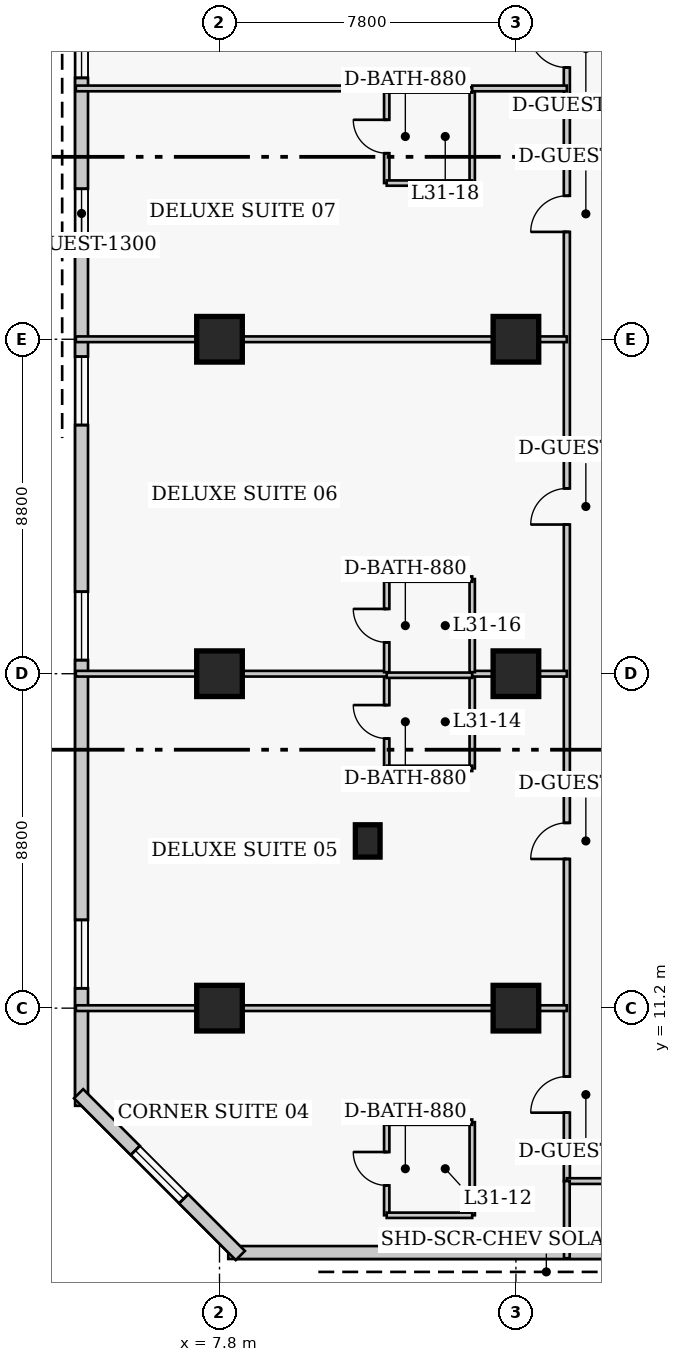
"""IFC4 building model, lengths in metres.
Left out: names, types, materials, properties, quantities, classifications, styles, units other than length and angle.
Written with IfcOpenShell. Run it as: python <this file> out.ifc"""

import sys

from ifc_helpers import new_model, si_unit, direction, frame, frame_2d, origin, origin_2d, place, context, subcontext, project, spatial, rectangle, extrude, element, fill, save


model = new_model("IFC4")
c1 = context("Model", 3, precision=1e-05, world=origin(), true_north=direction((0.0, 1.0)))
c2 = subcontext(c1, "Body", "Model", "MODEL_VIEW")
j1 = project(units=[si_unit("LENGTHUNIT", "METRE"), si_unit("PLANEANGLEUNIT", "RADIAN")], contexts=[c1])
p1 = place(None, origin())
s1 = spatial("IfcSite", under=j1, at=p1, CompositionType="ELEMENT")
p2 = place(p1, origin())
s2 = spatial("IfcBuilding", under=s1, at=p2, CompositionType="ELEMENT")
p3 = place(p2, frame((0.0, 0.0, 126.0)))
s3 = spatial("IfcBuildingStorey", under=s2, at=p3, CompositionType="ELEMENT", Elevation=126.0)
for number, where, z_axis, x_axis in (
    (1, (7.8, 11.2, 0.0), (0.0, 0.0, 1.0), (1.0, 0.0, 0.0)),
    (2, (7.8, 20.0, 0.0), (0.0, 0.0, 1.0), (1.0, 0.0, 0.0)),
    (3, (7.8, 28.8, 0.0), (0.0, 0.0, 1.0), (1.0, 0.0, 0.0)),
    (4, (15.6, 11.2, 0.0), (0.0, 0.0, 1.0), (1.0, 0.0, 0.0)),
    (5, (15.6, 20.0, 0.0), (0.0, 0.0, 1.0), (1.0, 0.0, 0.0)),
    (6, (15.6, 28.8, 0.0), (0.0, 0.0, 1.0), (1.0, 0.0, 0.0)),
):
    element("IfcColumn", number, at=place(p3, frame(where, z_axis=z_axis, x_axis=x_axis)), inside=s3, PredefinedType="COLUMN", context=c2, shape_type="SweptSolid", body=[
        extrude(rectangle(XDim=1.2, YDim=1.2, at=origin_2d()), origin(), (0.0, 0.0, 1.0), 3.8),
    ])
p4 = place(p3, frame((11.7, 15.6, 0.0), z_axis=(0.0, 0.0, 1.0), x_axis=(1.0, 0.0, 0.0)))
e7 = element("IfcColumn", 7, at=p4, inside=s3, PredefinedType="PILASTER", context=c2, shape_type="SweptSolid", body=[
    extrude(rectangle(XDim=0.65, YDim=0.85, at=origin_2d()), origin(), (0.0, 0.0, 1.0), 3.8),
])
p5 = place(p3, frame((8.03, 4.77, 0.0), z_axis=(0.0, 0.0, 1.0), x_axis=(1.0, 0.0, 0.0)))
e8 = element("IfcWall", 8, at=p5, inside=s3, PredefinedType="SOLIDWALL", context=c2, shape_type="SweptSolid", body=[
    extrude(rectangle(XDim=28.29, YDim=0.34, at=frame_2d((14.145, 0.0))), origin(), (0.0, 0.0, 1.0), 3.46),
])
p6 = place(p5, frame((12.595, 0.0, 0.85)))
e9 = element("IfcOpeningElement", 9, at=p6, cuts=e8, PredefinedType="OPENING", context=c2, shape_type="SweptSolid", body=[
    extrude(rectangle(XDim=1.8, YDim=1.8, at=frame_2d((0.9, 0.9))), frame((0.0, 0.18, 0.0), z_axis=(0.0, -1.0, 0.0), x_axis=(1.0, 0.0, 0.0)), (0.0, 0.0, 1.0), 0.36),
])
p7 = place(p3, frame((4.17, 40.57, 0.0), z_axis=(0.0, 0.0, 1.0), x_axis=(0.0, -1.0, 0.0)))
e10 = element("IfcWall", 10, at=p7, inside=s3, PredefinedType="SOLIDWALL", context=c2, shape_type="SweptSolid", body=[
    extrude(rectangle(XDim=31.94, YDim=0.34, at=frame_2d((15.97, 0.0))), origin(), (0.0, 0.0, 1.0), 3.46),
])
p8 = place(p7, frame((3.093, 0.0, 0.85)))
e11 = element("IfcOpeningElement", 11, at=p8, cuts=e10, PredefinedType="OPENING", context=c2, shape_type="SweptSolid", body=[
    extrude(rectangle(XDim=1.8, YDim=1.8, at=frame_2d((0.9, 0.9))), frame((0.0, 0.18, 0.0), z_axis=(0.0, -1.0, 0.0), x_axis=(1.0, 0.0, 0.0)), (0.0, 0.0, 1.0), 0.36),
])
p9 = place(p7, frame((12.228, 0.0, 0.85)))
e12 = element("IfcOpeningElement", 12, at=p9, cuts=e10, PredefinedType="OPENING", context=c2, shape_type="SweptSolid", body=[
    extrude(rectangle(XDim=1.8, YDim=1.8, at=frame_2d((0.9, 0.9))), frame((0.0, 0.18, 0.0), z_axis=(0.0, -1.0, 0.0), x_axis=(1.0, 0.0, 0.0)), (0.0, 0.0, 1.0), 0.36),
])
p10 = place(p7, frame((18.413, 0.0, 0.85)))
e13 = element("IfcOpeningElement", 13, at=p10, cuts=e10, PredefinedType="OPENING", context=c2, shape_type="SweptSolid", body=[
    extrude(rectangle(XDim=1.8, YDim=1.8, at=frame_2d((0.9, 0.9))), frame((0.0, 0.18, 0.0), z_axis=(0.0, -1.0, 0.0), x_axis=(1.0, 0.0, 0.0)), (0.0, 0.0, 1.0), 0.36),
])
p11 = place(p7, frame((27.048, 0.0, 0.85)))
e14 = element("IfcOpeningElement", 14, at=p11, cuts=e10, PredefinedType="OPENING", context=c2, shape_type="SweptSolid", body=[
    extrude(rectangle(XDim=1.8, YDim=1.8, at=frame_2d((0.9, 0.9))), frame((0.0, 0.18, 0.0), z_axis=(0.0, -1.0, 0.0), x_axis=(1.0, 0.0, 0.0)), (0.0, 0.0, 1.0), 0.36),
])
p12 = place(p7, frame((7.81, 0.0, 0.85)))
e15 = element("IfcOpeningElement", 15, at=p12, cuts=e10, PredefinedType="OPENING", context=c2, shape_type="SweptSolid", body=[
    extrude(rectangle(XDim=1.3, YDim=1.7, at=frame_2d((0.65, 0.85))), frame((0.0, 0.18, 0.0), z_axis=(0.0, -1.0, 0.0), x_axis=(1.0, 0.0, 0.0)), (0.0, 0.0, 1.0), 0.36),
])
p13 = place(p3, frame((4.092, 8.948, 0.0), z_axis=(0.0, 0.0, 1.0), x_axis=(0.707106781187, -0.707106781187, 0.0)))
e16 = element("IfcWall", 16, at=p13, inside=s3, PredefinedType="SOLIDWALL", context=c2, shape_type="SweptSolid", body=[
    extrude(rectangle(XDim=6.02, YDim=0.34, at=frame_2d((3.01, 0.0))), origin(), (0.0, 0.0, 1.0), 3.46),
])
p14 = place(p13, frame((2.11, 0.0, 0.85)))
e17 = element("IfcOpeningElement", 17, at=p14, cuts=e16, PredefinedType="OPENING", context=c2, shape_type="SweptSolid", body=[
    extrude(rectangle(XDim=1.8, YDim=1.8, at=frame_2d((0.9, 0.9))), frame((0.0, 0.18, 0.0), z_axis=(0.0, -1.0, 0.0), x_axis=(1.0, 0.0, 0.0)), (0.0, 0.0, 1.0), 0.36),
])
p15 = place(p3, frame((16.94, 6.65, 0.0), z_axis=(0.0, 0.0, 1.0), x_axis=(0.0, 1.0, 0.0)))
e18 = element("IfcWall", 18, at=p15, inside=s3, PredefinedType="PARTITIONING", context=c2, shape_type="SweptSolid", body=[
    extrude(rectangle(XDim=34.0, YDim=0.16, at=frame_2d((17.0, 0.0))), origin(), (0.0, 0.0, 1.0), 3.46),
])
p16 = place(p15, frame((1.8, 0.0, 0.0)))
e19 = element("IfcOpeningElement", 19, at=p16, cuts=e18, PredefinedType="OPENING", context=c2, shape_type="SweptSolid", body=[
    extrude(rectangle(XDim=0.95, YDim=2.1, at=frame_2d((0.475, 1.05))), frame((0.0, 0.09, 0.0), z_axis=(0.0, -1.0, 0.0), x_axis=(1.0, 0.0, 0.0)), (0.0, 0.0, 1.0), 0.18),
])
p17 = place(p15, frame((8.475, 0.0, 0.0)))
e20 = element("IfcOpeningElement", 20, at=p17, cuts=e18, PredefinedType="OPENING", context=c2, shape_type="SweptSolid", body=[
    extrude(rectangle(XDim=0.95, YDim=2.1, at=frame_2d((0.475, 1.05))), frame((0.0, 0.09, 0.0), z_axis=(0.0, -1.0, 0.0), x_axis=(1.0, 0.0, 0.0)), (0.0, 0.0, 1.0), 0.18),
])
p18 = place(p15, frame((17.275, 0.0, 0.0)))
e21 = element("IfcOpeningElement", 21, at=p18, cuts=e18, PredefinedType="OPENING", context=c2, shape_type="SweptSolid", body=[
    extrude(rectangle(XDim=0.95, YDim=2.1, at=frame_2d((0.475, 1.05))), frame((0.0, 0.09, 0.0), z_axis=(0.0, -1.0, 0.0), x_axis=(1.0, 0.0, 0.0)), (0.0, 0.0, 1.0), 0.18),
])
p19 = place(p15, frame((24.975, 0.0, 0.0)))
e22 = element("IfcOpeningElement", 22, at=p19, cuts=e18, PredefinedType="OPENING", context=c2, shape_type="SweptSolid", body=[
    extrude(rectangle(XDim=0.95, YDim=2.1, at=frame_2d((0.475, 1.05))), frame((0.0, 0.09, 0.0), z_axis=(0.0, -1.0, 0.0), x_axis=(1.0, 0.0, 0.0)), (0.0, 0.0, 1.0), 0.18),
])
p20 = place(p15, frame((29.3, 0.0, 0.0)))
e23 = element("IfcOpeningElement", 23, at=p20, cuts=e18, PredefinedType="OPENING", context=c2, shape_type="SweptSolid", body=[
    extrude(rectangle(XDim=1.0, YDim=2.15, at=frame_2d((0.5, 1.075))), frame((0.0, 0.09, 0.0), z_axis=(0.0, -1.0, 0.0), x_axis=(1.0, 0.0, 0.0)), (0.0, 0.0, 1.0), 0.18),
])
p21 = place(p3, frame((16.94, 6.65, 0.0), z_axis=(0.0, 0.0, 1.0), x_axis=(1.0, 0.0, 0.0)))
e24 = element("IfcWall", 24, at=p21, inside=s3, PredefinedType="PARTITIONING", context=c2, shape_type="SweptSolid", body=[
    extrude(rectangle(XDim=2.22, YDim=0.15, at=frame_2d((1.11, 0.0))), origin(), (0.0, 0.0, 1.0), 3.46),
])
p22 = place(p3, frame((16.94, 4.62, 0.0), z_axis=(0.0, 0.0, 1.0), x_axis=(0.0, 1.0, 0.0)))
e25 = element("IfcWall", 25, at=p22, inside=s3, PredefinedType="PARTITIONING", context=c2, shape_type="SweptSolid", body=[
    extrude(rectangle(XDim=2.03, YDim=0.15, at=frame_2d((1.015, 0.0))), origin(), (0.0, 0.0, 1.0), 3.46),
])
p23 = place(p3, frame((12.2, 5.75, 0.0), z_axis=(0.0, 0.0, 1.0), x_axis=(0.0, 1.0, 0.0)))
e26 = element("IfcWall", 26, at=p23, inside=s3, PredefinedType="PLUMBINGWALL", context=c2, shape_type="SweptSolid", body=[
    extrude(rectangle(XDim=2.45, YDim=0.14, at=frame_2d((1.225, 0.0))), origin(), (0.0, 0.0, 1.0), 3.46),
])
p24 = place(p23, frame((0.785, 0.0, 0.0)))
e27 = element("IfcOpeningElement", 27, at=p24, cuts=e26, PredefinedType="OPENING", context=c2, shape_type="SweptSolid", body=[
    extrude(rectangle(XDim=0.88, YDim=2.05, at=frame_2d((0.44, 1.025))), frame((0.0, 0.08, 0.0), z_axis=(0.0, -1.0, 0.0), x_axis=(1.0, 0.0, 0.0)), (0.0, 0.0, 1.0), 0.16),
])
p25 = place(p3, frame((14.45, 5.75, 0.0), z_axis=(0.0, 0.0, 1.0), x_axis=(0.0, 1.0, 0.0)))
e28 = element("IfcWall", 28, at=p25, inside=s3, PredefinedType="PLUMBINGWALL", context=c2, shape_type="SweptSolid", body=[
    extrude(rectangle(XDim=2.45, YDim=0.14, at=frame_2d((1.225, 0.0))), origin(), (0.0, 0.0, 1.0), 3.46),
])
for number, where, z_axis, x_axis in (
    (29, (12.2, 5.75, 0.0), (0.0, 0.0, 1.0), (1.0, 0.0, 0.0)),
    (30, (12.2, 8.2, 0.0), (0.0, 0.0, 1.0), (1.0, 0.0, 0.0)),
):
    element("IfcWall", number, at=place(p3, frame(where, z_axis=z_axis, x_axis=x_axis)), inside=s3, PredefinedType="PLUMBINGWALL", context=c2, shape_type="SweptSolid", body=[
        extrude(rectangle(XDim=2.25, YDim=0.14, at=frame_2d((1.125, 0.0))), origin(), (0.0, 0.0, 1.0), 3.46),
    ])
p26 = place(p3, frame((4.02, 11.2, 0.0), z_axis=(0.0, 0.0, 1.0), x_axis=(1.0, 0.0, 0.0)))
e31 = element("IfcWall", 31, at=p26, inside=s3, PredefinedType="PARTITIONING", context=c2, shape_type="SweptSolid", body=[
    extrude(rectangle(XDim=12.92, YDim=0.15, at=frame_2d((6.46, 0.0))), origin(), (0.0, 0.0, 1.0), 2.599),
])
p27 = place(p3, frame((12.2, 17.51, 0.0), z_axis=(0.0, 0.0, 1.0), x_axis=(0.0, 1.0, 0.0)))
e32 = element("IfcWall", 32, at=p27, inside=s3, PredefinedType="PLUMBINGWALL", context=c2, shape_type="SweptSolid", body=[
    extrude(rectangle(XDim=2.45, YDim=0.14, at=frame_2d((1.225, 0.0))), origin(), (0.0, 0.0, 1.0), 3.46),
])
p28 = place(p27, frame((0.785, 0.0, 0.0)))
e33 = element("IfcOpeningElement", 33, at=p28, cuts=e32, PredefinedType="OPENING", context=c2, shape_type="SweptSolid", body=[
    extrude(rectangle(XDim=0.88, YDim=2.05, at=frame_2d((0.44, 1.025))), frame((0.0, 0.08, 0.0), z_axis=(0.0, -1.0, 0.0), x_axis=(1.0, 0.0, 0.0)), (0.0, 0.0, 1.0), 0.16),
])
p29 = place(p3, frame((14.45, 17.51, 0.0), z_axis=(0.0, 0.0, 1.0), x_axis=(0.0, 1.0, 0.0)))
e34 = element("IfcWall", 34, at=p29, inside=s3, PredefinedType="PLUMBINGWALL", context=c2, shape_type="SweptSolid", body=[
    extrude(rectangle(XDim=2.45, YDim=0.14, at=frame_2d((1.225, 0.0))), origin(), (0.0, 0.0, 1.0), 3.46),
])
p30 = place(p3, frame((12.2, 17.51, 0.0), z_axis=(0.0, 0.0, 1.0), x_axis=(1.0, 0.0, 0.0)))
e35 = element("IfcWall", 35, at=p30, inside=s3, PredefinedType="PLUMBINGWALL", context=c2, shape_type="SweptSolid", body=[
    extrude(rectangle(XDim=2.25, YDim=0.14, at=frame_2d((1.125, 0.0))), origin(), (0.0, 0.0, 1.0), 3.46),
])
p31 = place(p3, frame((12.2, 19.96, 0.0), z_axis=(0.0, 0.0, 1.0), x_axis=(1.0, 0.0, 0.0)))
e36 = element("IfcWall", 36, at=p31, inside=s3, PredefinedType="PLUMBINGWALL", context=c2, shape_type="SweptSolid", body=[
    extrude(rectangle(XDim=2.25, YDim=0.14, at=frame_2d((1.125, 0.0))), origin(), (0.0, 0.0, 1.0), 2.599),
])
p32 = place(p3, frame((4.02, 20.0, 0.0), z_axis=(0.0, 0.0, 1.0), x_axis=(1.0, 0.0, 0.0)))
e37 = element("IfcWall", 37, at=p32, inside=s3, PredefinedType="PARTITIONING", context=c2, shape_type="SweptSolid", body=[
    extrude(rectangle(XDim=8.18, YDim=0.15, at=frame_2d((4.09, 0.0))), origin(), (0.0, 0.0, 1.0), 2.599),
])
p33 = place(p3, frame((14.45, 20.0, 0.0), z_axis=(0.0, 0.0, 1.0), x_axis=(1.0, 0.0, 0.0)))
e38 = element("IfcWall", 38, at=p33, inside=s3, PredefinedType="PARTITIONING", context=c2, shape_type="SweptSolid", body=[
    extrude(rectangle(XDim=2.49, YDim=0.15, at=frame_2d((1.245, 0.0))), origin(), (0.0, 0.0, 1.0), 2.599),
])
p34 = place(p3, frame((12.2, 20.04, 0.0), z_axis=(0.0, 0.0, 1.0), x_axis=(0.0, 1.0, 0.0)))
e39 = element("IfcWall", 39, at=p34, inside=s3, PredefinedType="PLUMBINGWALL", context=c2, shape_type="SweptSolid", body=[
    extrude(rectangle(XDim=2.45, YDim=0.14, at=frame_2d((1.225, 0.0))), origin(), (0.0, 0.0, 1.0), 3.46),
])
p35 = place(p34, frame((0.785, 0.0, 0.0)))
e40 = element("IfcOpeningElement", 40, at=p35, cuts=e39, PredefinedType="OPENING", context=c2, shape_type="SweptSolid", body=[
    extrude(rectangle(XDim=0.88, YDim=2.05, at=frame_2d((0.44, 1.025))), frame((0.0, 0.08, 0.0), z_axis=(0.0, -1.0, 0.0), x_axis=(1.0, 0.0, 0.0)), (0.0, 0.0, 1.0), 0.16),
])
p36 = place(p3, frame((14.45, 20.04, 0.0), z_axis=(0.0, 0.0, 1.0), x_axis=(0.0, 1.0, 0.0)))
e41 = element("IfcWall", 41, at=p36, inside=s3, PredefinedType="PLUMBINGWALL", context=c2, shape_type="SweptSolid", body=[
    extrude(rectangle(XDim=2.45, YDim=0.14, at=frame_2d((1.225, 0.0))), origin(), (0.0, 0.0, 1.0), 3.46),
])
p37 = place(p3, frame((12.2, 22.49, 0.0), z_axis=(0.0, 0.0, 1.0), x_axis=(1.0, 0.0, 0.0)))
e42 = element("IfcWall", 42, at=p37, inside=s3, PredefinedType="PLUMBINGWALL", context=c2, shape_type="SweptSolid", body=[
    extrude(rectangle(XDim=2.25, YDim=0.14, at=frame_2d((1.125, 0.0))), origin(), (0.0, 0.0, 1.0), 3.46),
])
p38 = place(p3, frame((4.02, 28.8, 0.0), z_axis=(0.0, 0.0, 1.0), x_axis=(1.0, 0.0, 0.0)))
e43 = element("IfcWall", 43, at=p38, inside=s3, PredefinedType="PARTITIONING", context=c2, shape_type="SweptSolid", body=[
    extrude(rectangle(XDim=12.92, YDim=0.15, at=frame_2d((6.46, 0.0))), origin(), (0.0, 0.0, 1.0), 2.599),
])
p39 = place(p3, frame((12.2, 32.91, 0.0), z_axis=(0.0, 0.0, 1.0), x_axis=(0.0, 1.0, 0.0)))
e44 = element("IfcWall", 44, at=p39, inside=s3, PredefinedType="PLUMBINGWALL", context=c2, shape_type="SweptSolid", body=[
    extrude(rectangle(XDim=2.45, YDim=0.14, at=frame_2d((1.225, 0.0))), origin(), (0.0, 0.0, 1.0), 3.46),
])
p40 = place(p39, frame((0.785, 0.0, 0.0)))
e45 = element("IfcOpeningElement", 45, at=p40, cuts=e44, PredefinedType="OPENING", context=c2, shape_type="SweptSolid", body=[
    extrude(rectangle(XDim=0.88, YDim=2.05, at=frame_2d((0.44, 1.025))), frame((0.0, 0.08, 0.0), z_axis=(0.0, -1.0, 0.0), x_axis=(1.0, 0.0, 0.0)), (0.0, 0.0, 1.0), 0.16),
])
p41 = place(p3, frame((14.45, 32.91, 0.0), z_axis=(0.0, 0.0, 1.0), x_axis=(0.0, 1.0, 0.0)))
e46 = element("IfcWall", 46, at=p41, inside=s3, PredefinedType="PLUMBINGWALL", context=c2, shape_type="SweptSolid", body=[
    extrude(rectangle(XDim=2.45, YDim=0.14, at=frame_2d((1.225, 0.0))), origin(), (0.0, 0.0, 1.0), 3.46),
])
for number, where, z_axis, x_axis in (
    (47, (12.2, 32.91, 0.0), (0.0, 0.0, 1.0), (1.0, 0.0, 0.0)),
    (48, (12.2, 35.36, 0.0), (0.0, 0.0, 1.0), (1.0, 0.0, 0.0)),
):
    element("IfcWall", number, at=place(p3, frame(where, z_axis=z_axis, x_axis=x_axis)), inside=s3, PredefinedType="PLUMBINGWALL", context=c2, shape_type="SweptSolid", body=[
        extrude(rectangle(XDim=2.25, YDim=0.14, at=frame_2d((1.125, 0.0))), origin(), (0.0, 0.0, 1.0), 3.46),
    ])
p42 = place(p3, frame((4.02, 35.4, 0.0), z_axis=(0.0, 0.0, 1.0), x_axis=(1.0, 0.0, 0.0)))
e49 = element("IfcWall", 49, at=p42, inside=s3, PredefinedType="PARTITIONING", context=c2, shape_type="SweptSolid", body=[
    extrude(rectangle(XDim=8.18, YDim=0.15, at=frame_2d((4.09, 0.0))), origin(), (0.0, 0.0, 1.0), 3.46),
])
p43 = place(p3, frame((14.45, 35.4, 0.0), z_axis=(0.0, 0.0, 1.0), x_axis=(1.0, 0.0, 0.0)))
e50 = element("IfcWall", 50, at=p43, inside=s3, PredefinedType="PARTITIONING", context=c2, shape_type="SweptSolid", body=[
    extrude(rectangle(XDim=2.49, YDim=0.15, at=frame_2d((1.245, 0.0))), origin(), (0.0, 0.0, 1.0), 3.46),
])
p44 = place(p8, origin())
e51 = element("IfcWindow", 51, at=p44, inside=s3, PartitioningType="SINGLE_PANEL", PredefinedType="WINDOW", context=c2, shape_type="SweptSolid", body=[
    extrude(rectangle(XDim=1.8, YDim=1.8, at=frame_2d((0.9, 0.9))), frame((0.0, 0.03, 0.0), z_axis=(0.0, -1.0, 0.0), x_axis=(1.0, 0.0, 0.0)), (0.0, 0.0, 1.0), 0.06),
])
fill(e11, e51)
p45 = place(p9, origin())
e52 = element("IfcWindow", 52, at=p45, inside=s3, PartitioningType="SINGLE_PANEL", PredefinedType="WINDOW", context=c2, shape_type="SweptSolid", body=[
    extrude(rectangle(XDim=1.8, YDim=1.8, at=frame_2d((0.9, 0.9))), frame((0.0, 0.03, 0.0), z_axis=(0.0, -1.0, 0.0), x_axis=(1.0, 0.0, 0.0)), (0.0, 0.0, 1.0), 0.06),
])
fill(e12, e52)
p46 = place(p10, origin())
e53 = element("IfcWindow", 53, at=p46, inside=s3, PartitioningType="SINGLE_PANEL", PredefinedType="WINDOW", context=c2, shape_type="SweptSolid", body=[
    extrude(rectangle(XDim=1.8, YDim=1.8, at=frame_2d((0.9, 0.9))), frame((0.0, 0.03, 0.0), z_axis=(0.0, -1.0, 0.0), x_axis=(1.0, 0.0, 0.0)), (0.0, 0.0, 1.0), 0.06),
])
fill(e13, e53)
p47 = place(p11, origin())
e54 = element("IfcWindow", 54, at=p47, inside=s3, PartitioningType="SINGLE_PANEL", PredefinedType="WINDOW", context=c2, shape_type="SweptSolid", body=[
    extrude(rectangle(XDim=1.8, YDim=1.8, at=frame_2d((0.9, 0.9))), frame((0.0, 0.03, 0.0), z_axis=(0.0, -1.0, 0.0), x_axis=(1.0, 0.0, 0.0)), (0.0, 0.0, 1.0), 0.06),
])
fill(e14, e54)
p48 = place(p14, origin())
e55 = element("IfcWindow", 55, at=p48, inside=s3, PartitioningType="SINGLE_PANEL", PredefinedType="WINDOW", context=c2, shape_type="SweptSolid", body=[
    extrude(rectangle(XDim=1.8, YDim=1.8, at=frame_2d((0.9, 0.9))), frame((0.0, 0.03, 0.0), z_axis=(0.0, -1.0, 0.0), x_axis=(1.0, 0.0, 0.0)), (0.0, 0.0, 1.0), 0.06),
])
fill(e17, e55)
p49 = place(p12, origin())
e56 = element("IfcWindow", 56, at=p49, inside=s3, PartitioningType="SINGLE_PANEL", PredefinedType="WINDOW", context=c2, shape_type="SweptSolid", body=[
    extrude(rectangle(XDim=1.3, YDim=1.7, at=frame_2d((0.65, 0.85))), frame((0.0, 0.03, 0.0), z_axis=(0.0, -1.0, 0.0), x_axis=(1.0, 0.0, 0.0)), (0.0, 0.0, 1.0), 0.06),
])
fill(e15, e56)
p50 = place(p24, origin())
e57 = element("IfcDoor", 57, at=p50, inside=s3, OperationType="SINGLE_SWING_RIGHT", PredefinedType="DOOR", context=c2, shape_type="SweptSolid", body=[
    extrude(rectangle(XDim=0.88, YDim=2.05, at=frame_2d((0.44, 1.025))), frame((0.0, 0.025, 0.0), z_axis=(0.0, -1.0, 0.0), x_axis=(1.0, 0.0, 0.0)), (0.0, 0.0, 1.0), 0.05),
])
fill(e27, e57)
p51 = place(p16, origin())
e58 = element("IfcDoor", 58, at=p51, inside=s3, OperationType="SINGLE_SWING_LEFT", PredefinedType="DOOR", context=c2, shape_type="SweptSolid", body=[
    extrude(rectangle(XDim=0.95, YDim=2.1, at=frame_2d((0.475, 1.05))), frame((0.0, 0.025, 0.0), z_axis=(0.0, -1.0, 0.0), x_axis=(1.0, 0.0, 0.0)), (0.0, 0.0, 1.0), 0.05),
])
fill(e19, e58)
p52 = place(p28, origin())
e59 = element("IfcDoor", 59, at=p52, inside=s3, OperationType="SINGLE_SWING_RIGHT", PredefinedType="DOOR", context=c2, shape_type="SweptSolid", body=[
    extrude(rectangle(XDim=0.88, YDim=2.05, at=frame_2d((0.44, 1.025))), frame((0.0, 0.025, 0.0), z_axis=(0.0, -1.0, 0.0), x_axis=(1.0, 0.0, 0.0)), (0.0, 0.0, 1.0), 0.05),
])
fill(e33, e59)
p53 = place(p17, origin())
e60 = element("IfcDoor", 60, at=p53, inside=s3, OperationType="SINGLE_SWING_LEFT", PredefinedType="DOOR", context=c2, shape_type="SweptSolid", body=[
    extrude(rectangle(XDim=0.95, YDim=2.1, at=frame_2d((0.475, 1.05))), frame((0.0, 0.025, 0.0), z_axis=(0.0, -1.0, 0.0), x_axis=(1.0, 0.0, 0.0)), (0.0, 0.0, 1.0), 0.05),
])
fill(e20, e60)
p54 = place(p35, origin())
e61 = element("IfcDoor", 61, at=p54, inside=s3, OperationType="SINGLE_SWING_RIGHT", PredefinedType="DOOR", context=c2, shape_type="SweptSolid", body=[
    extrude(rectangle(XDim=0.88, YDim=2.05, at=frame_2d((0.44, 1.025))), frame((0.0, 0.025, 0.0), z_axis=(0.0, -1.0, 0.0), x_axis=(1.0, 0.0, 0.0)), (0.0, 0.0, 1.0), 0.05),
])
fill(e40, e61)
p55 = place(p18, origin())
e62 = element("IfcDoor", 62, at=p55, inside=s3, OperationType="SINGLE_SWING_LEFT", PredefinedType="DOOR", context=c2, shape_type="SweptSolid", body=[
    extrude(rectangle(XDim=0.95, YDim=2.1, at=frame_2d((0.475, 1.05))), frame((0.0, 0.025, 0.0), z_axis=(0.0, -1.0, 0.0), x_axis=(1.0, 0.0, 0.0)), (0.0, 0.0, 1.0), 0.05),
])
fill(e21, e62)
p56 = place(p40, origin())
e63 = element("IfcDoor", 63, at=p56, inside=s3, OperationType="SINGLE_SWING_RIGHT", PredefinedType="DOOR", context=c2, shape_type="SweptSolid", body=[
    extrude(rectangle(XDim=0.88, YDim=2.05, at=frame_2d((0.44, 1.025))), frame((0.0, 0.025, 0.0), z_axis=(0.0, -1.0, 0.0), x_axis=(1.0, 0.0, 0.0)), (0.0, 0.0, 1.0), 0.05),
])
fill(e45, e63)
p57 = place(p19, origin())
e64 = element("IfcDoor", 64, at=p57, inside=s3, OperationType="SINGLE_SWING_LEFT", PredefinedType="DOOR", context=c2, shape_type="SweptSolid", body=[
    extrude(rectangle(XDim=0.95, YDim=2.1, at=frame_2d((0.475, 1.05))), frame((0.0, 0.025, 0.0), z_axis=(0.0, -1.0, 0.0), x_axis=(1.0, 0.0, 0.0)), (0.0, 0.0, 1.0), 0.05),
])
fill(e22, e64)
p58 = place(p20, origin())
e65 = element("IfcDoor", 65, at=p58, inside=s3, OperationType="SINGLE_SWING_RIGHT", PredefinedType="DOOR", context=c2, shape_type="SweptSolid", body=[
    extrude(rectangle(XDim=1.0, YDim=2.15, at=frame_2d((0.5, 1.075))), frame((0.0, 0.025, 0.0), z_axis=(0.0, -1.0, 0.0), x_axis=(1.0, 0.0, 0.0)), (0.0, 0.0, 1.0), 0.05),
])
fill(e23, e65)
save(model, sys.argv[1])
